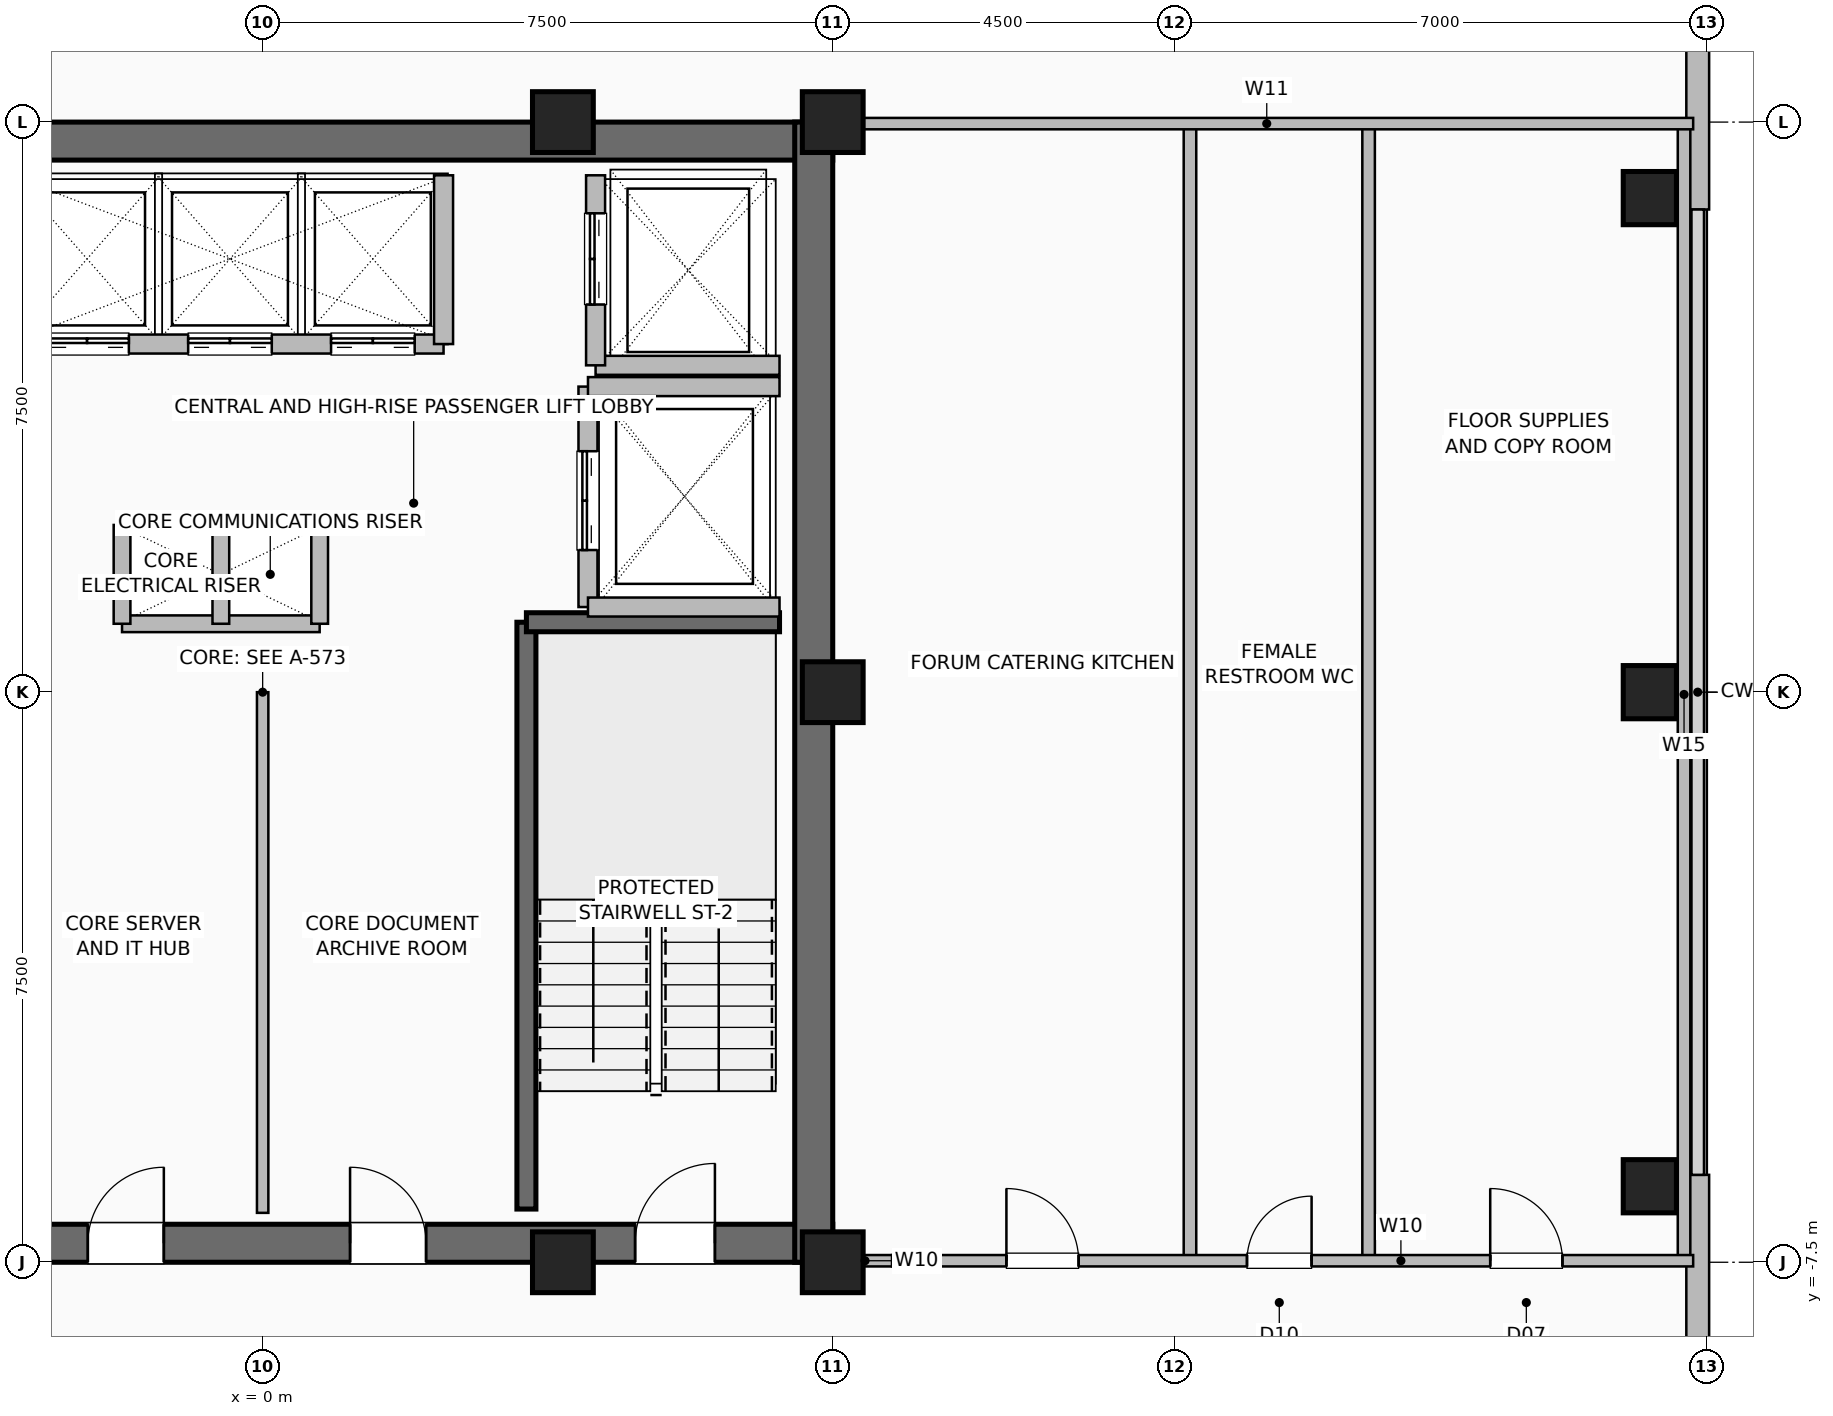
"""IFC4 building model, lengths in metres.
Left out: names, types, materials, properties, quantities, classifications, styles, units other than length and angle.
Written with IfcOpenShell. Run it as: python <this file> out.ifc"""

import sys

from ifc_helpers import new_model, si_unit, direction, frame, frame_2d, origin, origin_2d, place, context, subcontext, project, spatial, rectangle, hollow_rectangle, extrude, element, fill, save


model = new_model("IFC4")
c1 = context("Model", 3, precision=1e-05, world=origin(), true_north=direction((0.0, 1.0)))
c2 = subcontext(c1, "Body", "Model", "MODEL_VIEW")
j1 = project(units=[si_unit("LENGTHUNIT", "METRE"), si_unit("PLANEANGLEUNIT", "RADIAN")], contexts=[c1])
p1 = place(None, origin())
s1 = spatial("IfcSite", under=j1, at=p1, CompositionType="ELEMENT")
p2 = place(p1, origin())
s2 = spatial("IfcBuilding", under=s1, at=p2, CompositionType="ELEMENT")
p3 = place(p2, frame((0.0, 0.0, 290.0)))
s3 = spatial("IfcBuildingStorey", under=s2, at=p3, CompositionType="ELEMENT", Elevation=290.0)
for number, where, z_axis, x_axis in (
    (1, (3.95, -7.5, 0.0), (0.0, 0.0, 1.0), (1.0, 0.0, 0.0)),
    (2, (7.5, -7.5, 0.0), (0.0, 0.0, 1.0), (1.0, 0.0, 0.0)),
    (3, (7.5, 0.0, 0.0), (0.0, 0.0, 1.0), (1.0, 0.0, 0.0)),
    (4, (7.5, 7.5, 0.0), (0.0, 0.0, 1.0), (1.0, 0.0, 0.0)),
    (5, (3.95, 7.5, 0.0), (0.0, 0.0, 1.0), (1.0, 0.0, 0.0)),
):
    element("IfcColumn", number, at=place(p3, frame(where, z_axis=z_axis, x_axis=x_axis)), inside=s3, PredefinedType="COLUMN", context=c2, shape_type="SweptSolid", body=[
        extrude(hollow_rectangle(XDim=0.8, YDim=0.8, WallThickness=0.04, at=origin_2d()), origin(), (0.0, 0.0, 1.0), 3.6),
    ])
for number, where, z_axis, x_axis in (
    (6, (18.25, -6.5, 0.0), (0.0, 0.0, 1.0), (1.0, 0.0, 0.0)),
    (7, (18.25, 0.0, 0.0), (0.0, 0.0, 1.0), (1.0, 0.0, 0.0)),
    (8, (18.25, 6.5, 0.0), (0.0, 0.0, 1.0), (1.0, 0.0, 0.0)),
):
    element("IfcColumn", number, at=place(p3, frame(where, z_axis=z_axis, x_axis=x_axis)), inside=s3, PredefinedType="COLUMN", context=c2, shape_type="SweptSolid", body=[
        extrude(hollow_rectangle(XDim=0.7, YDim=0.7, WallThickness=0.035, at=origin_2d()), origin(), (0.0, 0.0, 1.0), 3.6),
    ])
for number, where, z_axis, x_axis in (
    (9, (18.88, -11.65, 0.0), (0.0, 0.0, 1.0), (0.0, 1.0, 0.0)),
    (10, (18.88, 6.35, 0.0), (0.0, 0.0, 1.0), (0.0, 1.0, 0.0)),
):
    element("IfcWall", number, at=place(p3, frame(where, z_axis=z_axis, x_axis=x_axis)), inside=s3, PredefinedType="SOLIDWALL", context=c2, shape_type="SweptSolid", body=[
        extrude(rectangle(XDim=5.3, YDim=0.3, at=frame_2d((2.65, 0.0))), origin(), (0.0, 0.0, 1.0), 3.36),
    ])
p4 = place(p3, frame((-7.5, -7.25, 0.0), z_axis=(0.0, 0.0, 1.0), x_axis=(1.0, 0.0, 0.0)))
e11 = element("IfcWall", 11, at=p4, inside=s3, PredefinedType="SHEAR", context=c2, shape_type="SweptSolid", body=[
    extrude(rectangle(XDim=15.0, YDim=0.5, at=frame_2d((7.5, 0.0))), origin(), (0.0, 0.0, 1.0), 3.36),
])
p5 = place(p4, frame((1.55, 0.0, 0.0)))
e12 = element("IfcOpeningElement", 12, at=p5, cuts=e11, PredefinedType="OPENING", context=c2, shape_type="SweptSolid", body=[
    extrude(rectangle(XDim=1.05, YDim=2.08, at=frame_2d((0.525, 1.04))), frame((0.0, 0.26, 0.0), z_axis=(0.0, -1.0, 0.0), x_axis=(1.0, 0.0, 0.0)), (0.0, 0.0, 1.0), 0.52),
])
p6 = place(p4, frame((12.4, 0.0, 0.0)))
e13 = element("IfcOpeningElement", 13, at=p6, cuts=e11, PredefinedType="OPENING", context=c2, shape_type="SweptSolid", body=[
    extrude(rectangle(XDim=1.05, YDim=2.08, at=frame_2d((0.525, 1.04))), frame((0.0, 0.26, 0.0), z_axis=(0.0, -1.0, 0.0), x_axis=(1.0, 0.0, 0.0)), (0.0, 0.0, 1.0), 0.52),
])
p7 = place(p4, frame((5.2, 0.0, 0.0)))
e14 = element("IfcOpeningElement", 14, at=p7, cuts=e11, PredefinedType="OPENING", context=c2, shape_type="SweptSolid", body=[
    extrude(rectangle(XDim=1.0, YDim=2.08, at=frame_2d((0.5, 1.04))), frame((0.0, 0.26, 0.0), z_axis=(0.0, -1.0, 0.0), x_axis=(1.0, 0.0, 0.0)), (0.0, 0.0, 1.0), 0.52),
])
p8 = place(p4, frame((8.65, 0.0, 0.0)))
e15 = element("IfcOpeningElement", 15, at=p8, cuts=e11, PredefinedType="OPENING", context=c2, shape_type="SweptSolid", body=[
    extrude(rectangle(XDim=1.0, YDim=2.08, at=frame_2d((0.5, 1.04))), frame((0.0, 0.26, 0.0), z_axis=(0.0, -1.0, 0.0), x_axis=(1.0, 0.0, 0.0)), (0.0, 0.0, 1.0), 0.52),
])
for number, where, z_axis, x_axis in (
    (16, (-7.5, 7.25, 0.0), (0.0, 0.0, 1.0), (1.0, 0.0, 0.0)),
    (17, (7.25, -7.5, 0.0), (0.0, 0.0, 1.0), (0.0, 1.0, 0.0)),
):
    element("IfcWall", number, at=place(p3, frame(where, z_axis=z_axis, x_axis=x_axis)), inside=s3, PredefinedType="SHEAR", context=c2, shape_type="SweptSolid", body=[
        extrude(rectangle(XDim=15.0, YDim=0.5, at=frame_2d((7.5, 0.0))), origin(), (0.0, 0.0, 1.0), 3.36),
    ])
p9 = place(p3, frame((3.47, -6.8, 0.0), z_axis=(0.0, 0.0, 1.0), x_axis=(0.0, 1.0, 0.0)))
e18 = element("IfcWall", 18, at=p9, inside=s3, PredefinedType="SHEAR", context=c2, shape_type="SweptSolid", body=[
    extrude(rectangle(XDim=7.72, YDim=0.25, at=frame_2d((3.86, 0.0))), origin(), (0.0, 0.0, 1.0), 3.36),
])
p10 = place(p3, frame((3.47, 0.92, 0.0), z_axis=(0.0, 0.0, 1.0), x_axis=(1.0, 0.0, 0.0)))
e19 = element("IfcWall", 19, at=p10, inside=s3, PredefinedType="SHEAR", context=c2, shape_type="SweptSolid", body=[
    extrude(rectangle(XDim=3.33, YDim=0.25, at=frame_2d((1.665, 0.0))), origin(), (0.0, 0.0, 1.0), 3.36),
])
for number, where, z_axis, x_axis in (
    (20, (-1.85, 2.2, 0.0), (0.0, 0.0, 1.0), (1.0, 0.0, 0.0)),
    (21, (-1.85, 0.9, 0.0), (0.0, 0.0, 1.0), (1.0, 0.0, 0.0)),
):
    element("IfcWall", number, at=place(p3, frame(where, z_axis=z_axis, x_axis=x_axis)), inside=s3, PredefinedType="PARTITIONING", context=c2, shape_type="SweptSolid", body=[
        extrude(rectangle(XDim=2.6, YDim=0.22, at=frame_2d((1.3, 0.0))), origin(), (0.0, 0.0, 1.0), 3.36),
    ])
for number, where, z_axis, x_axis in (
    (22, (-0.55, 0.9, 0.0), (0.0, 0.0, 1.0), (0.0, 1.0, 0.0)),
    (23, (0.75, 0.9, 0.0), (0.0, 0.0, 1.0), (0.0, 1.0, 0.0)),
    (24, (-1.85, 0.9, 0.0), (0.0, 0.0, 1.0), (0.0, 1.0, 0.0)),
):
    element("IfcWall", number, at=place(p3, frame(where, z_axis=z_axis, x_axis=x_axis)), inside=s3, PredefinedType="PARTITIONING", context=c2, shape_type="SweptSolid", body=[
        extrude(rectangle(XDim=1.3, YDim=0.22, at=frame_2d((0.65, 0.0))), origin(), (0.0, 0.0, 1.0), 3.36),
    ])
p11 = place(p3, frame((-3.26, 4.58, 0.0), z_axis=(0.0, 0.0, 1.0), x_axis=(1.0, 0.0, 0.0)))
e25 = element("IfcWall", 25, at=p11, inside=s3, PredefinedType="SHEAR", context=c2, shape_type="SweptSolid", body=[
    extrude(rectangle(XDim=5.64, YDim=0.25, at=frame_2d((2.82, 0.0))), origin(), (0.0, 0.0, 1.0), 3.36),
])
p12 = place(p11, frame((0.4, 0.0, 0.0)))
e26 = element("IfcOpeningElement", 26, at=p12, cuts=e25, PredefinedType="OPENING", context=c2, shape_type="SweptSolid", body=[
    extrude(rectangle(XDim=1.1, YDim=2.2, at=frame_2d((0.55, 1.1))), frame((0.0, 0.135, 0.0), z_axis=(0.0, -1.0, 0.0), x_axis=(1.0, 0.0, 0.0)), (0.0, 0.0, 1.0), 0.27),
])
p13 = place(p11, frame((2.28, 0.0, 0.0)))
e27 = element("IfcOpeningElement", 27, at=p13, cuts=e25, PredefinedType="OPENING", context=c2, shape_type="SweptSolid", body=[
    extrude(rectangle(XDim=1.1, YDim=2.2, at=frame_2d((0.55, 1.1))), frame((0.0, 0.135, 0.0), z_axis=(0.0, -1.0, 0.0), x_axis=(1.0, 0.0, 0.0)), (0.0, 0.0, 1.0), 0.27),
])
p14 = place(p11, frame((4.16, 0.0, 0.0)))
e28 = element("IfcOpeningElement", 28, at=p14, cuts=e25, PredefinedType="OPENING", context=c2, shape_type="SweptSolid", body=[
    extrude(rectangle(XDim=1.1, YDim=2.2, at=frame_2d((0.55, 1.1))), frame((0.0, 0.135, 0.0), z_axis=(0.0, -1.0, 0.0), x_axis=(1.0, 0.0, 0.0)), (0.0, 0.0, 1.0), 0.27),
])
p15 = place(p3, frame((2.38, 4.58, 0.0), z_axis=(0.0, 0.0, 1.0), x_axis=(0.0, 1.0, 0.0)))
e29 = element("IfcWall", 29, at=p15, inside=s3, PredefinedType="SHEAR", context=c2, shape_type="SweptSolid", body=[
    extrude(rectangle(XDim=2.22, YDim=0.25, at=frame_2d((1.11, 0.0))), origin(), (0.0, 0.0, 1.0), 3.36),
])
p16 = place(p3, frame((4.38, 4.3, 0.0), z_axis=(0.0, 0.0, 1.0), x_axis=(1.0, 0.0, 0.0)))
e30 = element("IfcWall", 30, at=p16, inside=s3, PredefinedType="SHEAR", context=c2, shape_type="SweptSolid", body=[
    extrude(rectangle(XDim=2.42, YDim=0.25, at=frame_2d((1.21, 0.0))), origin(), (0.0, 0.0, 1.0), 3.36),
])
p17 = place(p3, frame((4.38, 4.3, 0.0), z_axis=(0.0, 0.0, 1.0), x_axis=(0.0, 1.0, 0.0)))
e31 = element("IfcWall", 31, at=p17, inside=s3, PredefinedType="SHEAR", context=c2, shape_type="SweptSolid", body=[
    extrude(rectangle(XDim=2.5, YDim=0.25, at=frame_2d((1.25, 0.0))), origin(), (0.0, 0.0, 1.0), 3.36),
])
p18 = place(p17, frame((0.8, 0.0, 0.0)))
e32 = element("IfcOpeningElement", 32, at=p18, cuts=e31, PredefinedType="OPENING", context=c2, shape_type="SweptSolid", body=[
    extrude(rectangle(XDim=1.2, YDim=2.2, at=frame_2d((0.6, 1.1))), frame((0.0, 0.135, 0.0), z_axis=(0.0, -1.0, 0.0), x_axis=(1.0, 0.0, 0.0)), (0.0, 0.0, 1.0), 0.27),
])
p19 = place(p3, frame((4.28, 1.12, 0.0), z_axis=(0.0, 0.0, 1.0), x_axis=(0.0, 1.0, 0.0)))
e33 = element("IfcWall", 33, at=p19, inside=s3, PredefinedType="SHEAR", context=c2, shape_type="SweptSolid", body=[
    extrude(rectangle(XDim=2.9, YDim=0.25, at=frame_2d((1.45, 0.0))), origin(), (0.0, 0.0, 1.0), 3.36),
])
p20 = place(p19, frame((0.75, 0.0, 0.0)))
e34 = element("IfcOpeningElement", 34, at=p20, cuts=e33, PredefinedType="OPENING", context=c2, shape_type="SweptSolid", body=[
    extrude(rectangle(XDim=1.3, YDim=2.3, at=frame_2d((0.65, 1.15))), frame((0.0, 0.135, 0.0), z_axis=(0.0, -1.0, 0.0), x_axis=(1.0, 0.0, 0.0)), (0.0, 0.0, 1.0), 0.27),
])
for number, where, z_axis, x_axis in (
    (35, (4.28, 1.12, 0.0), (0.0, 0.0, 1.0), (1.0, 0.0, 0.0)),
    (36, (4.28, 4.02, 0.0), (0.0, 0.0, 1.0), (1.0, 0.0, 0.0)),
):
    element("IfcWall", number, at=place(p3, frame(where, z_axis=z_axis, x_axis=x_axis)), inside=s3, PredefinedType="SHEAR", context=c2, shape_type="SweptSolid", body=[
        extrude(rectangle(XDim=2.52, YDim=0.25, at=frame_2d((1.26, 0.0))), origin(), (0.0, 0.0, 1.0), 3.36),
    ])
p21 = place(p3, frame((0.0, -6.85, 0.0), z_axis=(0.0, 0.0, 1.0), x_axis=(0.0, 1.0, 0.0)))
e37 = element("IfcWall", 37, at=p21, inside=s3, PredefinedType="PARTITIONING", context=c2, shape_type="SweptSolid", body=[
    extrude(rectangle(XDim=6.85, YDim=0.15, at=frame_2d((3.425, 0.0))), origin(), (0.0, 0.0, 1.0), 3.36),
])
p22 = place(p3, frame((7.45, -7.48, 0.0), z_axis=(0.0, 0.0, 1.0), x_axis=(1.0, 0.0, 0.0)))
e38 = element("IfcWall", 38, at=p22, inside=s3, PredefinedType="PARTITIONING", context=c2, shape_type="SweptSolid", body=[
    extrude(rectangle(XDim=0.95, YDim=0.15, at=frame_2d((0.475, 0.0))), origin(), (0.0, 0.0, 1.0), 3.36),
])
for number, where, z_axis, x_axis in (
    (39, (14.55, -7.48, 0.0), (0.0, 0.0, 1.0), (0.0, 1.0, 0.0)),
    (40, (12.2, -7.48, 0.0), (0.0, 0.0, 1.0), (0.0, 1.0, 0.0)),
    (41, (18.7, -7.48, 0.0), (0.0, 0.0, 1.0), (0.0, 1.0, 0.0)),
):
    element("IfcWall", number, at=place(p3, frame(where, z_axis=z_axis, x_axis=x_axis)), inside=s3, PredefinedType="PLUMBINGWALL", context=c2, shape_type="SweptSolid", body=[
        extrude(rectangle(XDim=14.9, YDim=0.165, at=frame_2d((7.45, 0.0))), origin(), (0.0, 0.0, 1.0), 3.36),
    ])
p23 = place(p3, frame((8.28, -7.48, 0.0), z_axis=(0.0, 0.0, 1.0), x_axis=(1.0, 0.0, 0.0)))
e42 = element("IfcWall", 42, at=p23, inside=s3, PredefinedType="PARTITIONING", context=c2, shape_type="SweptSolid", body=[
    extrude(rectangle(XDim=10.54, YDim=0.15, at=frame_2d((5.27, 0.0))), origin(), (0.0, 0.0, 1.0), 3.36),
])
p24 = place(p23, frame((1.505, 0.0, 0.0)))
e43 = element("IfcOpeningElement", 43, at=p24, cuts=e42, PredefinedType="OPENING", context=c2, shape_type="SweptSolid", body=[
    extrude(rectangle(XDim=0.95, YDim=2.06, at=frame_2d((0.475, 1.03))), frame((0.0, 0.085, 0.0), z_axis=(0.0, -1.0, 0.0), x_axis=(1.0, 0.0, 0.0)), (0.0, 0.0, 1.0), 0.17),
])
p25 = place(p23, frame((4.67, 0.0, 0.0)))
e44 = element("IfcOpeningElement", 44, at=p25, cuts=e42, PredefinedType="OPENING", context=c2, shape_type="SweptSolid", body=[
    extrude(rectangle(XDim=0.85, YDim=2.05, at=frame_2d((0.425, 1.025))), frame((0.0, 0.085, 0.0), z_axis=(0.0, -1.0, 0.0), x_axis=(1.0, 0.0, 0.0)), (0.0, 0.0, 1.0), 0.17),
])
p26 = place(p23, frame((7.87, 0.0, 0.0)))
e45 = element("IfcOpeningElement", 45, at=p26, cuts=e42, PredefinedType="OPENING", context=c2, shape_type="SweptSolid", body=[
    extrude(rectangle(XDim=0.95, YDim=2.06, at=frame_2d((0.475, 1.03))), frame((0.0, 0.085, 0.0), z_axis=(0.0, -1.0, 0.0), x_axis=(1.0, 0.0, 0.0)), (0.0, 0.0, 1.0), 0.17),
])
p27 = place(p3, frame((7.6, 7.48, 0.0), z_axis=(0.0, 0.0, 1.0), x_axis=(1.0, 0.0, 0.0)))
e46 = element("IfcWall", 46, at=p27, inside=s3, PredefinedType="PARTITIONING", context=c2, shape_type="SweptSolid", body=[
    extrude(rectangle(XDim=11.22, YDim=0.15, at=frame_2d((5.61, 0.0))), origin(), (0.0, 0.0, 1.0), 3.36),
])
p28 = place(p6, origin())
e47 = element("IfcDoor", 47, at=p28, inside=s3, OperationType="SINGLE_SWING_RIGHT", PredefinedType="DOOR", context=c2, shape_type="SweptSolid", body=[
    extrude(rectangle(XDim=1.05, YDim=2.08, at=frame_2d((0.525, 1.04))), frame((0.0, 0.025, 0.0), z_axis=(0.0, -1.0, 0.0), x_axis=(1.0, 0.0, 0.0)), (0.0, 0.0, 1.0), 0.05),
])
fill(e13, e47)
p29 = place(p7, origin())
e48 = element("IfcDoor", 48, at=p29, inside=s3, OperationType="SINGLE_SWING_RIGHT", PredefinedType="DOOR", context=c2, shape_type="SweptSolid", body=[
    extrude(rectangle(XDim=1.0, YDim=2.08, at=frame_2d((0.5, 1.04))), frame((0.0, 0.025, 0.0), z_axis=(0.0, -1.0, 0.0), x_axis=(1.0, 0.0, 0.0)), (0.0, 0.0, 1.0), 0.05),
])
fill(e14, e48)
p30 = place(p8, origin())
e49 = element("IfcDoor", 49, at=p30, inside=s3, OperationType="SINGLE_SWING_LEFT", PredefinedType="DOOR", context=c2, shape_type="SweptSolid", body=[
    extrude(rectangle(XDim=1.0, YDim=2.08, at=frame_2d((0.5, 1.04))), frame((0.0, 0.025, 0.0), z_axis=(0.0, -1.0, 0.0), x_axis=(1.0, 0.0, 0.0)), (0.0, 0.0, 1.0), 0.05),
])
fill(e15, e49)
p31 = place(p12, origin())
e50 = element("IfcDoor", 50, at=p31, inside=s3, OperationType="DOUBLE_DOOR_SLIDING", PredefinedType="DOOR", context=c2, shape_type="SweptSolid", body=[
    extrude(rectangle(XDim=1.1, YDim=2.2, at=frame_2d((0.55, 1.1))), frame((0.0, 0.025, 0.0), z_axis=(0.0, -1.0, 0.0), x_axis=(1.0, 0.0, 0.0)), (0.0, 0.0, 1.0), 0.05),
])
fill(e26, e50)
p32 = place(p13, origin())
e51 = element("IfcDoor", 51, at=p32, inside=s3, OperationType="DOUBLE_DOOR_SLIDING", PredefinedType="DOOR", context=c2, shape_type="SweptSolid", body=[
    extrude(rectangle(XDim=1.1, YDim=2.2, at=frame_2d((0.55, 1.1))), frame((0.0, 0.025, 0.0), z_axis=(0.0, -1.0, 0.0), x_axis=(1.0, 0.0, 0.0)), (0.0, 0.0, 1.0), 0.05),
])
fill(e27, e51)
p33 = place(p14, origin())
e52 = element("IfcDoor", 52, at=p33, inside=s3, OperationType="DOUBLE_DOOR_SLIDING", PredefinedType="DOOR", context=c2, shape_type="SweptSolid", body=[
    extrude(rectangle(XDim=1.1, YDim=2.2, at=frame_2d((0.55, 1.1))), frame((0.0, 0.025, 0.0), z_axis=(0.0, -1.0, 0.0), x_axis=(1.0, 0.0, 0.0)), (0.0, 0.0, 1.0), 0.05),
])
fill(e28, e52)
p34 = place(p18, origin())
e53 = element("IfcDoor", 53, at=p34, inside=s3, OperationType="DOUBLE_DOOR_SLIDING", PredefinedType="DOOR", context=c2, shape_type="SweptSolid", body=[
    extrude(rectangle(XDim=1.2, YDim=2.2, at=frame_2d((0.6, 1.1))), frame((0.0, 0.025, 0.0), z_axis=(0.0, -1.0, 0.0), x_axis=(1.0, 0.0, 0.0)), (0.0, 0.0, 1.0), 0.05),
])
fill(e32, e53)
p35 = place(p20, origin())
e54 = element("IfcDoor", 54, at=p35, inside=s3, OperationType="DOUBLE_DOOR_SLIDING", PredefinedType="DOOR", context=c2, shape_type="SweptSolid", body=[
    extrude(rectangle(XDim=1.3, YDim=2.3, at=frame_2d((0.65, 1.15))), frame((0.0, 0.025, 0.0), z_axis=(0.0, -1.0, 0.0), x_axis=(1.0, 0.0, 0.0)), (0.0, 0.0, 1.0), 0.05),
])
fill(e34, e54)
p36 = place(p24, origin())
e55 = element("IfcDoor", 55, at=p36, inside=s3, OperationType="SINGLE_SWING_LEFT", PredefinedType="DOOR", context=c2, shape_type="SweptSolid", body=[
    extrude(rectangle(XDim=0.95, YDim=2.06, at=frame_2d((0.475, 1.03))), frame((0.0, 0.025, 0.0), z_axis=(0.0, -1.0, 0.0), x_axis=(1.0, 0.0, 0.0)), (0.0, 0.0, 1.0), 0.05),
])
fill(e43, e55)
p37 = place(p25, origin())
e56 = element("IfcDoor", 56, at=p37, inside=s3, OperationType="SINGLE_SWING_RIGHT", PredefinedType="DOOR", context=c2, shape_type="SweptSolid", body=[
    extrude(rectangle(XDim=0.85, YDim=2.05, at=frame_2d((0.425, 1.025))), frame((0.0, 0.025, 0.0), z_axis=(0.0, -1.0, 0.0), x_axis=(1.0, 0.0, 0.0)), (0.0, 0.0, 1.0), 0.05),
])
fill(e44, e56)
p38 = place(p26, origin())
e57 = element("IfcDoor", 57, at=p38, inside=s3, OperationType="SINGLE_SWING_LEFT", PredefinedType="DOOR", context=c2, shape_type="SweptSolid", body=[
    extrude(rectangle(XDim=0.95, YDim=2.06, at=frame_2d((0.475, 1.03))), frame((0.0, 0.025, 0.0), z_axis=(0.0, -1.0, 0.0), x_axis=(1.0, 0.0, 0.0)), (0.0, 0.0, 1.0), 0.05),
])
fill(e45, e57)
save(model, sys.argv[1])
